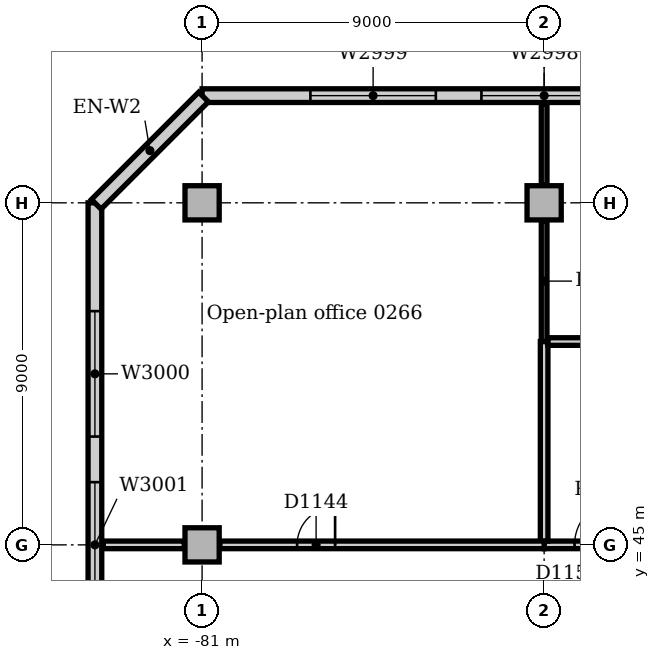
"""IFC4 building model, lengths in metres.
Left out: names, types, materials, properties, quantities, classifications, styles, units other than length and angle.
Written with IfcOpenShell. Run it as: python <this file> out.ifc"""

import sys

from ifc_helpers import new_model, si_unit, direction, frame, frame_2d, origin, origin_2d, place, context, subcontext, project, spatial, rectangle, extrude, element, fill, save


model = new_model("IFC4")
c1 = context("Model", 3, precision=1e-05, world=origin(), true_north=direction((0.0, 1.0)))
c2 = subcontext(c1, "Body", "Model", "MODEL_VIEW")
j1 = project(units=[si_unit("LENGTHUNIT", "METRE"), si_unit("PLANEANGLEUNIT", "RADIAN")], contexts=[c1])
p1 = place(None, origin())
s1 = spatial("IfcSite", under=j1, at=p1, CompositionType="ELEMENT")
p2 = place(p1, origin())
s2 = spatial("IfcBuilding", under=s1, at=p2, CompositionType="ELEMENT")
p3 = place(p2, frame((0.0, 0.0, 11.0)))
s3 = spatial("IfcBuildingStorey", under=s2, at=p3, CompositionType="ELEMENT", Elevation=11.0)
for number, where, z_axis, x_axis in (
    (1, (-81.0, 45.0, 0.0), (0.0, 0.0, 1.0), (1.0, 0.0, 0.0)),
    (2, (-81.0, 54.0, 0.0), (0.0, 0.0, 1.0), (1.0, 0.0, 0.0)),
    (3, (-72.0, 54.0, 0.0), (0.0, 0.0, 1.0), (1.0, 0.0, 0.0)),
):
    element("IfcColumn", number, at=place(p3, frame(where, z_axis=z_axis, x_axis=x_axis)), inside=s3, PredefinedType="COLUMN", context=c2, shape_type="SweptSolid", body=[
        extrude(rectangle(XDim=0.9, YDim=0.9, at=origin_2d()), origin(), (0.0, 0.0, 1.0), 4.7),
    ])
p4 = place(p3, frame((63.0, 56.82, 0.0), z_axis=(0.0, 0.0, 1.0), x_axis=(-1.0, 0.0, 0.0)))
e4 = element("IfcWall", 4, at=p4, inside=s3, PredefinedType="STANDARD", context=c2, shape_type="SweptSolid", body=[
    extrude(rectangle(XDim=144.0, YDim=0.36, at=frame_2d((72.0, 0.0))), origin(), (0.0, 0.0, 1.0), 4.7),
])
p5 = place(p4, frame((2.85, 0.0, 0.9)))
e5 = element("IfcOpeningElement", 5, at=p5, cuts=e4, PredefinedType="OPENING", context=c2, shape_type="SweptSolid", body=[
    extrude(rectangle(XDim=3.3, YDim=2.4, at=frame_2d((1.65, 1.2))), frame((0.0, 0.19, 0.0), z_axis=(0.0, -1.0, 0.0), x_axis=(1.0, 0.0, 0.0)), (0.0, 0.0, 1.0), 0.38),
])
p6 = place(p4, frame((7.35, 0.0, 0.9)))
e6 = element("IfcOpeningElement", 6, at=p6, cuts=e4, PredefinedType="OPENING", context=c2, shape_type="SweptSolid", body=[
    extrude(rectangle(XDim=3.3, YDim=2.4, at=frame_2d((1.65, 1.2))), frame((0.0, 0.19, 0.0), z_axis=(0.0, -1.0, 0.0), x_axis=(1.0, 0.0, 0.0)), (0.0, 0.0, 1.0), 0.38),
])
p7 = place(p4, frame((11.85, 0.0, 0.9)))
e7 = element("IfcOpeningElement", 7, at=p7, cuts=e4, PredefinedType="OPENING", context=c2, shape_type="SweptSolid", body=[
    extrude(rectangle(XDim=3.3, YDim=2.4, at=frame_2d((1.65, 1.2))), frame((0.0, 0.19, 0.0), z_axis=(0.0, -1.0, 0.0), x_axis=(1.0, 0.0, 0.0)), (0.0, 0.0, 1.0), 0.38),
])
p8 = place(p4, frame((16.35, 0.0, 0.9)))
e8 = element("IfcOpeningElement", 8, at=p8, cuts=e4, PredefinedType="OPENING", context=c2, shape_type="SweptSolid", body=[
    extrude(rectangle(XDim=3.3, YDim=2.4, at=frame_2d((1.65, 1.2))), frame((0.0, 0.19, 0.0), z_axis=(0.0, -1.0, 0.0), x_axis=(1.0, 0.0, 0.0)), (0.0, 0.0, 1.0), 0.38),
])
p9 = place(p4, frame((20.85, 0.0, 0.9)))
e9 = element("IfcOpeningElement", 9, at=p9, cuts=e4, PredefinedType="OPENING", context=c2, shape_type="SweptSolid", body=[
    extrude(rectangle(XDim=3.3, YDim=2.4, at=frame_2d((1.65, 1.2))), frame((0.0, 0.19, 0.0), z_axis=(0.0, -1.0, 0.0), x_axis=(1.0, 0.0, 0.0)), (0.0, 0.0, 1.0), 0.38),
])
p10 = place(p4, frame((25.35, 0.0, 0.9)))
e10 = element("IfcOpeningElement", 10, at=p10, cuts=e4, PredefinedType="OPENING", context=c2, shape_type="SweptSolid", body=[
    extrude(rectangle(XDim=3.3, YDim=2.4, at=frame_2d((1.65, 1.2))), frame((0.0, 0.19, 0.0), z_axis=(0.0, -1.0, 0.0), x_axis=(1.0, 0.0, 0.0)), (0.0, 0.0, 1.0), 0.38),
])
p11 = place(p4, frame((29.85, 0.0, 0.9)))
e11 = element("IfcOpeningElement", 11, at=p11, cuts=e4, PredefinedType="OPENING", context=c2, shape_type="SweptSolid", body=[
    extrude(rectangle(XDim=3.3, YDim=2.4, at=frame_2d((1.65, 1.2))), frame((0.0, 0.19, 0.0), z_axis=(0.0, -1.0, 0.0), x_axis=(1.0, 0.0, 0.0)), (0.0, 0.0, 1.0), 0.38),
])
p12 = place(p4, frame((34.35, 0.0, 0.9)))
e12 = element("IfcOpeningElement", 12, at=p12, cuts=e4, PredefinedType="OPENING", context=c2, shape_type="SweptSolid", body=[
    extrude(rectangle(XDim=3.3, YDim=2.4, at=frame_2d((1.65, 1.2))), frame((0.0, 0.19, 0.0), z_axis=(0.0, -1.0, 0.0), x_axis=(1.0, 0.0, 0.0)), (0.0, 0.0, 1.0), 0.38),
])
p13 = place(p4, frame((38.85, 0.0, 0.9)))
e13 = element("IfcOpeningElement", 13, at=p13, cuts=e4, PredefinedType="OPENING", context=c2, shape_type="SweptSolid", body=[
    extrude(rectangle(XDim=3.3, YDim=2.4, at=frame_2d((1.65, 1.2))), frame((0.0, 0.19, 0.0), z_axis=(0.0, -1.0, 0.0), x_axis=(1.0, 0.0, 0.0)), (0.0, 0.0, 1.0), 0.38),
])
p14 = place(p4, frame((43.35, 0.0, 0.9)))
e14 = element("IfcOpeningElement", 14, at=p14, cuts=e4, PredefinedType="OPENING", context=c2, shape_type="SweptSolid", body=[
    extrude(rectangle(XDim=3.3, YDim=2.4, at=frame_2d((1.65, 1.2))), frame((0.0, 0.19, 0.0), z_axis=(0.0, -1.0, 0.0), x_axis=(1.0, 0.0, 0.0)), (0.0, 0.0, 1.0), 0.38),
])
p15 = place(p4, frame((47.85, 0.0, 0.9)))
e15 = element("IfcOpeningElement", 15, at=p15, cuts=e4, PredefinedType="OPENING", context=c2, shape_type="SweptSolid", body=[
    extrude(rectangle(XDim=3.3, YDim=2.4, at=frame_2d((1.65, 1.2))), frame((0.0, 0.19, 0.0), z_axis=(0.0, -1.0, 0.0), x_axis=(1.0, 0.0, 0.0)), (0.0, 0.0, 1.0), 0.38),
])
p16 = place(p4, frame((52.35, 0.0, 0.9)))
e16 = element("IfcOpeningElement", 16, at=p16, cuts=e4, PredefinedType="OPENING", context=c2, shape_type="SweptSolid", body=[
    extrude(rectangle(XDim=3.3, YDim=2.4, at=frame_2d((1.65, 1.2))), frame((0.0, 0.19, 0.0), z_axis=(0.0, -1.0, 0.0), x_axis=(1.0, 0.0, 0.0)), (0.0, 0.0, 1.0), 0.38),
])
p17 = place(p4, frame((56.85, 0.0, 0.9)))
e17 = element("IfcOpeningElement", 17, at=p17, cuts=e4, PredefinedType="OPENING", context=c2, shape_type="SweptSolid", body=[
    extrude(rectangle(XDim=3.3, YDim=2.4, at=frame_2d((1.65, 1.2))), frame((0.0, 0.19, 0.0), z_axis=(0.0, -1.0, 0.0), x_axis=(1.0, 0.0, 0.0)), (0.0, 0.0, 1.0), 0.38),
])
p18 = place(p4, frame((92.85, 0.0, 0.9)))
e18 = element("IfcOpeningElement", 18, at=p18, cuts=e4, PredefinedType="OPENING", context=c2, shape_type="SweptSolid", body=[
    extrude(rectangle(XDim=3.3, YDim=2.4, at=frame_2d((1.65, 1.2))), frame((0.0, 0.19, 0.0), z_axis=(0.0, -1.0, 0.0), x_axis=(1.0, 0.0, 0.0)), (0.0, 0.0, 1.0), 0.38),
])
p19 = place(p4, frame((97.35, 0.0, 0.9)))
e19 = element("IfcOpeningElement", 19, at=p19, cuts=e4, PredefinedType="OPENING", context=c2, shape_type="SweptSolid", body=[
    extrude(rectangle(XDim=3.3, YDim=2.4, at=frame_2d((1.65, 1.2))), frame((0.0, 0.19, 0.0), z_axis=(0.0, -1.0, 0.0), x_axis=(1.0, 0.0, 0.0)), (0.0, 0.0, 1.0), 0.38),
])
p20 = place(p4, frame((101.85, 0.0, 0.9)))
e20 = element("IfcOpeningElement", 20, at=p20, cuts=e4, PredefinedType="OPENING", context=c2, shape_type="SweptSolid", body=[
    extrude(rectangle(XDim=3.3, YDim=2.4, at=frame_2d((1.65, 1.2))), frame((0.0, 0.19, 0.0), z_axis=(0.0, -1.0, 0.0), x_axis=(1.0, 0.0, 0.0)), (0.0, 0.0, 1.0), 0.38),
])
p21 = place(p4, frame((106.35, 0.0, 0.9)))
e21 = element("IfcOpeningElement", 21, at=p21, cuts=e4, PredefinedType="OPENING", context=c2, shape_type="SweptSolid", body=[
    extrude(rectangle(XDim=3.3, YDim=2.4, at=frame_2d((1.65, 1.2))), frame((0.0, 0.19, 0.0), z_axis=(0.0, -1.0, 0.0), x_axis=(1.0, 0.0, 0.0)), (0.0, 0.0, 1.0), 0.38),
])
p22 = place(p4, frame((110.85, 0.0, 0.9)))
e22 = element("IfcOpeningElement", 22, at=p22, cuts=e4, PredefinedType="OPENING", context=c2, shape_type="SweptSolid", body=[
    extrude(rectangle(XDim=3.3, YDim=2.4, at=frame_2d((1.65, 1.2))), frame((0.0, 0.19, 0.0), z_axis=(0.0, -1.0, 0.0), x_axis=(1.0, 0.0, 0.0)), (0.0, 0.0, 1.0), 0.38),
])
p23 = place(p4, frame((115.35, 0.0, 0.9)))
e23 = element("IfcOpeningElement", 23, at=p23, cuts=e4, PredefinedType="OPENING", context=c2, shape_type="SweptSolid", body=[
    extrude(rectangle(XDim=3.3, YDim=2.4, at=frame_2d((1.65, 1.2))), frame((0.0, 0.19, 0.0), z_axis=(0.0, -1.0, 0.0), x_axis=(1.0, 0.0, 0.0)), (0.0, 0.0, 1.0), 0.38),
])
p24 = place(p4, frame((119.85, 0.0, 0.9)))
e24 = element("IfcOpeningElement", 24, at=p24, cuts=e4, PredefinedType="OPENING", context=c2, shape_type="SweptSolid", body=[
    extrude(rectangle(XDim=3.3, YDim=2.4, at=frame_2d((1.65, 1.2))), frame((0.0, 0.19, 0.0), z_axis=(0.0, -1.0, 0.0), x_axis=(1.0, 0.0, 0.0)), (0.0, 0.0, 1.0), 0.38),
])
p25 = place(p4, frame((124.35, 0.0, 0.9)))
e25 = element("IfcOpeningElement", 25, at=p25, cuts=e4, PredefinedType="OPENING", context=c2, shape_type="SweptSolid", body=[
    extrude(rectangle(XDim=3.3, YDim=2.4, at=frame_2d((1.65, 1.2))), frame((0.0, 0.19, 0.0), z_axis=(0.0, -1.0, 0.0), x_axis=(1.0, 0.0, 0.0)), (0.0, 0.0, 1.0), 0.38),
])
p26 = place(p4, frame((128.85, 0.0, 0.9)))
e26 = element("IfcOpeningElement", 26, at=p26, cuts=e4, PredefinedType="OPENING", context=c2, shape_type="SweptSolid", body=[
    extrude(rectangle(XDim=3.3, YDim=2.4, at=frame_2d((1.65, 1.2))), frame((0.0, 0.19, 0.0), z_axis=(0.0, -1.0, 0.0), x_axis=(1.0, 0.0, 0.0)), (0.0, 0.0, 1.0), 0.38),
])
p27 = place(p4, frame((133.35, 0.0, 0.9)))
e27 = element("IfcOpeningElement", 27, at=p27, cuts=e4, PredefinedType="OPENING", context=c2, shape_type="SweptSolid", body=[
    extrude(rectangle(XDim=3.3, YDim=2.4, at=frame_2d((1.65, 1.2))), frame((0.0, 0.19, 0.0), z_axis=(0.0, -1.0, 0.0), x_axis=(1.0, 0.0, 0.0)), (0.0, 0.0, 1.0), 0.38),
])
p28 = place(p4, frame((137.85, 0.0, 0.9)))
e28 = element("IfcOpeningElement", 28, at=p28, cuts=e4, PredefinedType="OPENING", context=c2, shape_type="SweptSolid", body=[
    extrude(rectangle(XDim=3.3, YDim=2.4, at=frame_2d((1.65, 1.2))), frame((0.0, 0.19, 0.0), z_axis=(0.0, -1.0, 0.0), x_axis=(1.0, 0.0, 0.0)), (0.0, 0.0, 1.0), 0.38),
])
p29 = place(p3, frame((-83.82, 54.0, 0.0), z_axis=(0.0, 0.0, 1.0), x_axis=(0.0, -1.0, 0.0)))
e29 = element("IfcWall", 29, at=p29, inside=s3, PredefinedType="STANDARD", context=c2, shape_type="SweptSolid", body=[
    extrude(rectangle(XDim=63.0, YDim=0.36, at=frame_2d((31.5, 0.0))), origin(), (0.0, 0.0, 1.0), 4.7),
])
p30 = place(p29, frame((2.85, 0.0, 0.9)))
e30 = element("IfcOpeningElement", 30, at=p30, cuts=e29, PredefinedType="OPENING", context=c2, shape_type="SweptSolid", body=[
    extrude(rectangle(XDim=3.3, YDim=2.4, at=frame_2d((1.65, 1.2))), frame((0.0, 0.19, 0.0), z_axis=(0.0, -1.0, 0.0), x_axis=(1.0, 0.0, 0.0)), (0.0, 0.0, 1.0), 0.38),
])
p31 = place(p29, frame((7.35, 0.0, 0.9)))
e31 = element("IfcOpeningElement", 31, at=p31, cuts=e29, PredefinedType="OPENING", context=c2, shape_type="SweptSolid", body=[
    extrude(rectangle(XDim=3.3, YDim=2.4, at=frame_2d((1.65, 1.2))), frame((0.0, 0.19, 0.0), z_axis=(0.0, -1.0, 0.0), x_axis=(1.0, 0.0, 0.0)), (0.0, 0.0, 1.0), 0.38),
])
p32 = place(p29, frame((11.85, 0.0, 0.9)))
e32 = element("IfcOpeningElement", 32, at=p32, cuts=e29, PredefinedType="OPENING", context=c2, shape_type="SweptSolid", body=[
    extrude(rectangle(XDim=3.3, YDim=2.4, at=frame_2d((1.65, 1.2))), frame((0.0, 0.19, 0.0), z_axis=(0.0, -1.0, 0.0), x_axis=(1.0, 0.0, 0.0)), (0.0, 0.0, 1.0), 0.38),
])
p33 = place(p29, frame((16.35, 0.0, 0.9)))
e33 = element("IfcOpeningElement", 33, at=p33, cuts=e29, PredefinedType="OPENING", context=c2, shape_type="SweptSolid", body=[
    extrude(rectangle(XDim=3.3, YDim=2.4, at=frame_2d((1.65, 1.2))), frame((0.0, 0.19, 0.0), z_axis=(0.0, -1.0, 0.0), x_axis=(1.0, 0.0, 0.0)), (0.0, 0.0, 1.0), 0.38),
])
p34 = place(p29, frame((20.85, 0.0, 0.9)))
e34 = element("IfcOpeningElement", 34, at=p34, cuts=e29, PredefinedType="OPENING", context=c2, shape_type="SweptSolid", body=[
    extrude(rectangle(XDim=3.3, YDim=2.4, at=frame_2d((1.65, 1.2))), frame((0.0, 0.19, 0.0), z_axis=(0.0, -1.0, 0.0), x_axis=(1.0, 0.0, 0.0)), (0.0, 0.0, 1.0), 0.38),
])
p35 = place(p29, frame((25.35, 0.0, 0.9)))
e35 = element("IfcOpeningElement", 35, at=p35, cuts=e29, PredefinedType="OPENING", context=c2, shape_type="SweptSolid", body=[
    extrude(rectangle(XDim=3.3, YDim=2.4, at=frame_2d((1.65, 1.2))), frame((0.0, 0.19, 0.0), z_axis=(0.0, -1.0, 0.0), x_axis=(1.0, 0.0, 0.0)), (0.0, 0.0, 1.0), 0.38),
])
p36 = place(p29, frame((29.85, 0.0, 0.9)))
e36 = element("IfcOpeningElement", 36, at=p36, cuts=e29, PredefinedType="OPENING", context=c2, shape_type="SweptSolid", body=[
    extrude(rectangle(XDim=3.3, YDim=2.4, at=frame_2d((1.65, 1.2))), frame((0.0, 0.19, 0.0), z_axis=(0.0, -1.0, 0.0), x_axis=(1.0, 0.0, 0.0)), (0.0, 0.0, 1.0), 0.38),
])
p37 = place(p29, frame((34.35, 0.0, 0.9)))
e37 = element("IfcOpeningElement", 37, at=p37, cuts=e29, PredefinedType="OPENING", context=c2, shape_type="SweptSolid", body=[
    extrude(rectangle(XDim=3.3, YDim=2.4, at=frame_2d((1.65, 1.2))), frame((0.0, 0.19, 0.0), z_axis=(0.0, -1.0, 0.0), x_axis=(1.0, 0.0, 0.0)), (0.0, 0.0, 1.0), 0.38),
])
p38 = place(p29, frame((38.85, 0.0, 0.9)))
e38 = element("IfcOpeningElement", 38, at=p38, cuts=e29, PredefinedType="OPENING", context=c2, shape_type="SweptSolid", body=[
    extrude(rectangle(XDim=3.3, YDim=2.4, at=frame_2d((1.65, 1.2))), frame((0.0, 0.19, 0.0), z_axis=(0.0, -1.0, 0.0), x_axis=(1.0, 0.0, 0.0)), (0.0, 0.0, 1.0), 0.38),
])
p39 = place(p29, frame((43.35, 0.0, 0.9)))
e39 = element("IfcOpeningElement", 39, at=p39, cuts=e29, PredefinedType="OPENING", context=c2, shape_type="SweptSolid", body=[
    extrude(rectangle(XDim=3.3, YDim=2.4, at=frame_2d((1.65, 1.2))), frame((0.0, 0.19, 0.0), z_axis=(0.0, -1.0, 0.0), x_axis=(1.0, 0.0, 0.0)), (0.0, 0.0, 1.0), 0.38),
])
p40 = place(p29, frame((47.85, 0.0, 0.9)))
e40 = element("IfcOpeningElement", 40, at=p40, cuts=e29, PredefinedType="OPENING", context=c2, shape_type="SweptSolid", body=[
    extrude(rectangle(XDim=3.3, YDim=2.4, at=frame_2d((1.65, 1.2))), frame((0.0, 0.19, 0.0), z_axis=(0.0, -1.0, 0.0), x_axis=(1.0, 0.0, 0.0)), (0.0, 0.0, 1.0), 0.38),
])
p41 = place(p29, frame((52.35, 0.0, 0.9)))
e41 = element("IfcOpeningElement", 41, at=p41, cuts=e29, PredefinedType="OPENING", context=c2, shape_type="SweptSolid", body=[
    extrude(rectangle(XDim=3.3, YDim=2.4, at=frame_2d((1.65, 1.2))), frame((0.0, 0.19, 0.0), z_axis=(0.0, -1.0, 0.0), x_axis=(1.0, 0.0, 0.0)), (0.0, 0.0, 1.0), 0.38),
])
p42 = place(p29, frame((56.85, 0.0, 0.9)))
e42 = element("IfcOpeningElement", 42, at=p42, cuts=e29, PredefinedType="OPENING", context=c2, shape_type="SweptSolid", body=[
    extrude(rectangle(XDim=3.3, YDim=2.4, at=frame_2d((1.65, 1.2))), frame((0.0, 0.19, 0.0), z_axis=(0.0, -1.0, 0.0), x_axis=(1.0, 0.0, 0.0)), (0.0, 0.0, 1.0), 0.38),
])
p43 = place(p3, frame((-80.961, 56.784, 0.0), z_axis=(0.0, 0.0, 1.0), x_axis=(-0.707106781187, -0.707106781187, 0.0)))
e43 = element("IfcWall", 43, at=p43, inside=s3, PredefinedType="STANDARD", context=c2, shape_type="SweptSolid", body=[
    extrude(rectangle(XDim=3.993, YDim=0.36, at=frame_2d((1.996, 0.0))), origin(), (0.0, 0.0, 1.0), 4.7),
])
p44 = place(p3, frame((-72.0, 45.0, 0.0), z_axis=(0.0, 0.0, 1.0), x_axis=(1.0, 0.0, 0.0)))
e44 = element("IfcWall", 44, at=p44, inside=s3, PredefinedType="SOLIDWALL", context=c2, shape_type="SweptSolid", body=[
    extrude(rectangle(XDim=9.0, YDim=0.2, at=frame_2d((4.5, 0.0))), origin(), (0.0, 0.0, 1.0), 4.7),
])
p45 = place(p44, frame((0.8, 0.0, 0.0)))
e45 = element("IfcOpeningElement", 45, at=p45, cuts=e44, PredefinedType="OPENING", context=c2, shape_type="SweptSolid", body=[
    extrude(rectangle(XDim=1.2, YDim=2.1, at=frame_2d((0.6, 1.05))), frame((0.0, 0.11, 0.0), z_axis=(0.0, -1.0, 0.0), x_axis=(1.0, 0.0, 0.0)), (0.0, 0.0, 1.0), 0.22),
])
p46 = place(p3, frame((-72.0, 45.1, 0.0), z_axis=(0.0, 0.0, 1.0), x_axis=(0.0, 1.0, 0.0)))
e46 = element("IfcWall", 46, at=p46, inside=s3, PredefinedType="SOLIDWALL", context=c2, shape_type="SweptSolid", body=[
    extrude(rectangle(XDim=5.25, YDim=0.2, at=frame_2d((2.625, 0.0))), origin(), (0.0, 0.0, 1.0), 4.7),
])
p47 = place(p3, frame((-71.9, 50.35, 0.0), z_axis=(0.0, 0.0, 1.0), x_axis=(1.0, 0.0, 0.0)))
e47 = element("IfcWall", 47, at=p47, inside=s3, PredefinedType="SOLIDWALL", context=c2, shape_type="SweptSolid", body=[
    extrude(rectangle(XDim=9.0, YDim=0.2, at=frame_2d((4.5, 0.0))), origin(), (0.0, 0.0, 1.0), 4.7),
])
p48 = place(p3, frame((-83.6, 45.0, 0.0), z_axis=(0.0, 0.0, 1.0), x_axis=(1.0, 0.0, 0.0)))
e48 = element("IfcWall", 48, at=p48, inside=s3, PredefinedType="PARTITIONING", context=c2, shape_type="SweptSolid", body=[
    extrude(rectangle(XDim=2.13, YDim=0.2, at=frame_2d((1.065, 0.0))), origin(), (0.0, 0.0, 1.0), 4.7),
])
p49 = place(p3, frame((-80.53, 45.0, 0.0), z_axis=(0.0, 0.0, 1.0), x_axis=(1.0, 0.0, 0.0)))
e49 = element("IfcWall", 49, at=p49, inside=s3, PredefinedType="PARTITIONING", context=c2, shape_type="SweptSolid", body=[
    extrude(rectangle(XDim=8.53, YDim=0.2, at=frame_2d((4.265, 0.0))), origin(), (0.0, 0.0, 1.0), 4.7),
])
p50 = place(p49, frame((2.03, 0.0, 0.0)))
e50 = element("IfcOpeningElement", 50, at=p50, cuts=e49, PredefinedType="OPENING", context=c2, shape_type="SweptSolid", body=[
    extrude(rectangle(XDim=1.0, YDim=2.1, at=frame_2d((0.5, 1.05))), frame((0.0, 0.11, 0.0), z_axis=(0.0, -1.0, 0.0), x_axis=(1.0, 0.0, 0.0)), (0.0, 0.0, 1.0), 0.22),
])
p51 = place(p3, frame((-72.0, 50.35, 0.0), z_axis=(0.0, 0.0, 1.0), x_axis=(0.0, 1.0, 0.0)))
e51 = element("IfcWall", 51, at=p51, inside=s3, PredefinedType="PARTITIONING", context=c2, shape_type="SweptSolid", body=[
    extrude(rectangle(XDim=3.18, YDim=0.15, at=frame_2d((1.59, 0.0))), origin(), (0.0, 0.0, 1.0), 4.7),
])
p52 = place(p3, frame((-72.0, 54.47, 0.0), z_axis=(0.0, 0.0, 1.0), x_axis=(0.0, 1.0, 0.0)))
e52 = element("IfcWall", 52, at=p52, inside=s3, PredefinedType="PARTITIONING", context=c2, shape_type="SweptSolid", body=[
    extrude(rectangle(XDim=2.13, YDim=0.15, at=frame_2d((1.065, 0.0))), origin(), (0.0, 0.0, 1.0), 4.7),
])
p53 = place(p27, origin())
e53 = element("IfcWindow", 53, at=p53, inside=s3, PartitioningType="SINGLE_PANEL", PredefinedType="WINDOW", context=c2, shape_type="SweptSolid", body=[
    extrude(rectangle(XDim=3.3, YDim=2.4, at=frame_2d((1.65, 1.2))), frame((0.0, 0.13, 0.0), z_axis=(0.0, -1.0, 0.0), x_axis=(1.0, 0.0, 0.0)), (0.0, 0.0, 1.0), 0.06),
])
fill(e27, e53)
p54 = place(p28, origin())
e54 = element("IfcWindow", 54, at=p54, inside=s3, PartitioningType="SINGLE_PANEL", PredefinedType="WINDOW", context=c2, shape_type="SweptSolid", body=[
    extrude(rectangle(XDim=3.3, YDim=2.4, at=frame_2d((1.65, 1.2))), frame((0.0, 0.13, 0.0), z_axis=(0.0, -1.0, 0.0), x_axis=(1.0, 0.0, 0.0)), (0.0, 0.0, 1.0), 0.06),
])
fill(e28, e54)
p55 = place(p30, origin())
e55 = element("IfcWindow", 55, at=p55, inside=s3, PartitioningType="SINGLE_PANEL", PredefinedType="WINDOW", context=c2, shape_type="SweptSolid", body=[
    extrude(rectangle(XDim=3.3, YDim=2.4, at=frame_2d((1.65, 1.2))), frame((0.0, 0.13, 0.0), z_axis=(0.0, -1.0, 0.0), x_axis=(1.0, 0.0, 0.0)), (0.0, 0.0, 1.0), 0.06),
])
fill(e30, e55)
p56 = place(p31, origin())
e56 = element("IfcWindow", 56, at=p56, inside=s3, PartitioningType="SINGLE_PANEL", PredefinedType="WINDOW", context=c2, shape_type="SweptSolid", body=[
    extrude(rectangle(XDim=3.3, YDim=2.4, at=frame_2d((1.65, 1.2))), frame((0.0, 0.13, 0.0), z_axis=(0.0, -1.0, 0.0), x_axis=(1.0, 0.0, 0.0)), (0.0, 0.0, 1.0), 0.06),
])
fill(e31, e56)
p57 = place(p50, origin())
e57 = element("IfcDoor", 57, at=p57, inside=s3, OperationType="SINGLE_SWING_RIGHT", PredefinedType="DOOR", context=c2, shape_type="SweptSolid", body=[
    extrude(rectangle(XDim=1.0, YDim=2.1, at=frame_2d((0.5, 1.05))), frame((0.0, 0.025, 0.0), z_axis=(0.0, -1.0, 0.0), x_axis=(1.0, 0.0, 0.0)), (0.0, 0.0, 1.0), 0.05),
])
fill(e50, e57)
p58 = place(p45, origin())
e58 = element("IfcDoor", 58, at=p58, inside=s3, OperationType="SINGLE_SWING_RIGHT", PredefinedType="DOOR", context=c2, shape_type="SweptSolid", body=[
    extrude(rectangle(XDim=1.2, YDim=2.1, at=frame_2d((0.6, 1.05))), frame((0.0, 0.025, 0.0), z_axis=(0.0, -1.0, 0.0), x_axis=(1.0, 0.0, 0.0)), (0.0, 0.0, 1.0), 0.05),
])
fill(e45, e58)
save(model, sys.argv[1])
